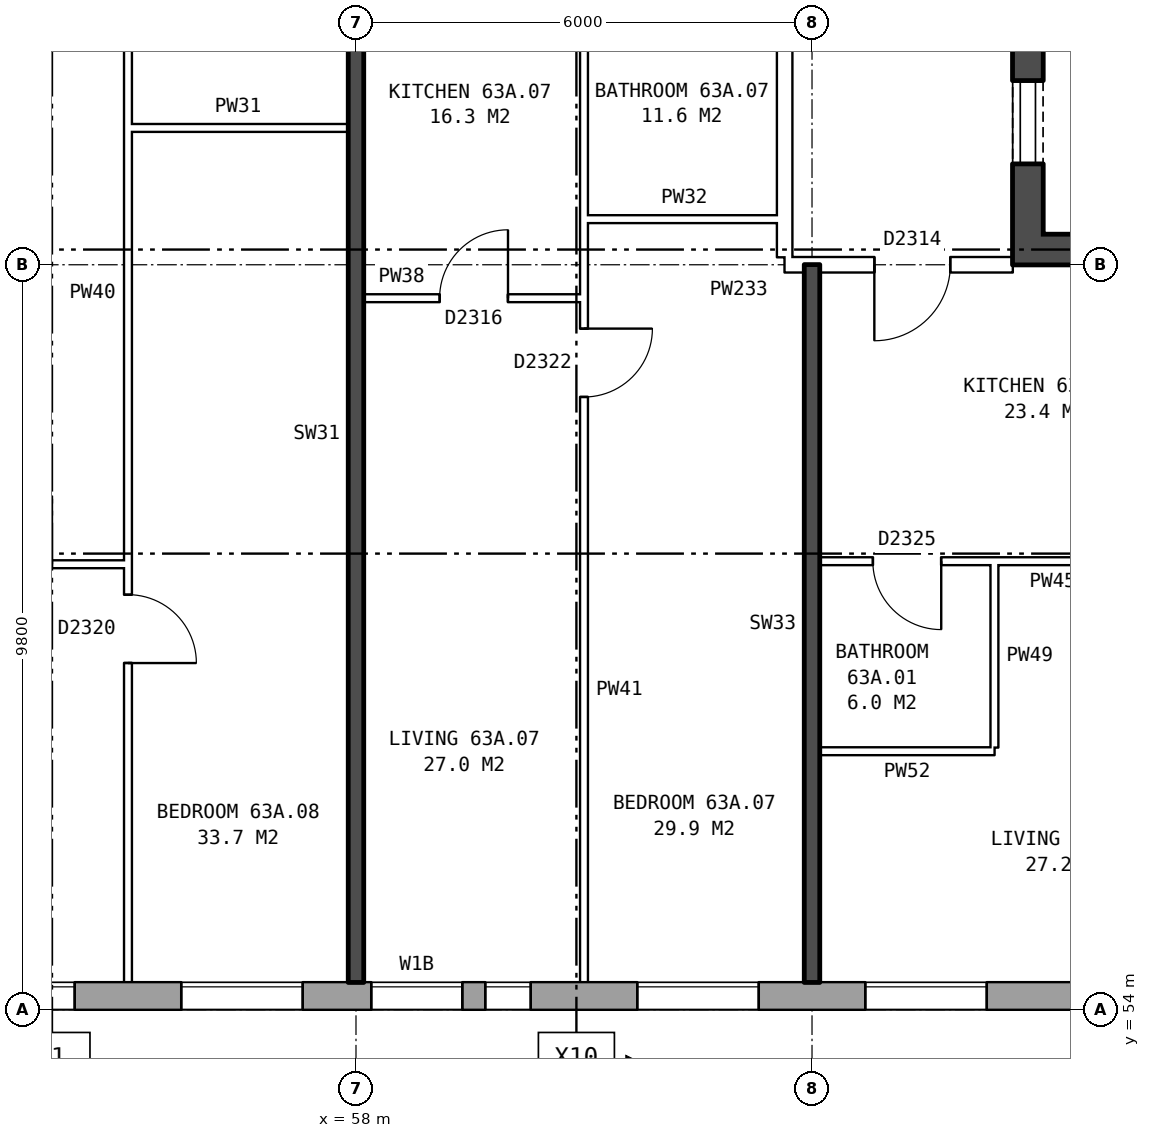
"""IFC4 building model, lengths in metres.
Left out: names, types, materials, properties, quantities, classifications, styles, units other than length and angle.
Written with IfcOpenShell. Run it as: python <this file> out.ifc"""

import sys

from ifc_helpers import new_model, si_unit, direction, frame, frame_2d, origin, place, context, subcontext, project, spatial, rectangle, extrude, element, fill, save


model = new_model("IFC4")
c1 = context("Model", 3, precision=1e-05, world=origin(), true_north=direction((0.0, 1.0)))
c2 = subcontext(c1, "Body", "Model", "MODEL_VIEW")
j1 = project(units=[si_unit("LENGTHUNIT", "METRE"), si_unit("PLANEANGLEUNIT", "RADIAN")], contexts=[c1])
p1 = place(None, origin())
s1 = spatial("IfcSite", under=j1, at=p1, CompositionType="ELEMENT")
p2 = place(p1, origin())
s2 = spatial("IfcBuilding", under=s1, at=p2, CompositionType="ELEMENT")
p3 = place(p2, frame((0.0, 0.0, 224.5)))
s3 = spatial("IfcBuildingStorey", under=s2, at=p3, CompositionType="ELEMENT", Elevation=224.5)
p4 = place(p3, frame((35.075, 54.18, 0.0), z_axis=(0.0, 0.0, 1.0), x_axis=(1.0, 0.0, 0.0)))
e1 = element("IfcWall", 1, at=p4, inside=s3, PredefinedType="STANDARD", context=c2, shape_type="SweptSolid", body=[
    extrude(rectangle(XDim=39.875, YDim=0.36, at=frame_2d((19.938, 0.0))), origin(), (0.0, 0.0, 1.0), 2.85),
])
p5 = place(p4, frame((2.625, 0.0, 0.8)))
e2 = element("IfcOpeningElement", 2, at=p5, cuts=e1, PredefinedType="OPENING", context=c2, shape_type="SweptSolid", body=[
    extrude(rectangle(XDim=1.6, YDim=1.8, at=frame_2d((0.8, 0.9))), frame((0.0, 0.19, 0.0), z_axis=(0.0, -1.0, 0.0), x_axis=(1.0, 0.0, 0.0)), (0.0, 0.0, 1.0), 0.38),
])
p6 = place(p4, frame((5.625, 0.0, 0.8)))
e3 = element("IfcOpeningElement", 3, at=p6, cuts=e1, PredefinedType="OPENING", context=c2, shape_type="SweptSolid", body=[
    extrude(rectangle(XDim=1.6, YDim=1.8, at=frame_2d((0.8, 0.9))), frame((0.0, 0.19, 0.0), z_axis=(0.0, -1.0, 0.0), x_axis=(1.0, 0.0, 0.0)), (0.0, 0.0, 1.0), 0.38),
])
p7 = place(p4, frame((8.625, 0.0, 0.8)))
e4 = element("IfcOpeningElement", 4, at=p7, cuts=e1, PredefinedType="OPENING", context=c2, shape_type="SweptSolid", body=[
    extrude(rectangle(XDim=1.6, YDim=1.8, at=frame_2d((0.8, 0.9))), frame((0.0, 0.19, 0.0), z_axis=(0.0, -1.0, 0.0), x_axis=(1.0, 0.0, 0.0)), (0.0, 0.0, 1.0), 0.38),
])
p8 = place(p4, frame((11.125, 0.0, 1.65)))
e5 = element("IfcOpeningElement", 5, at=p8, cuts=e1, PredefinedType="OPENING", context=c2, shape_type="SweptSolid", body=[
    extrude(rectangle(XDim=0.6, YDim=0.9, at=frame_2d((0.3, 0.45))), frame((0.0, 0.19, 0.0), z_axis=(0.0, -1.0, 0.0), x_axis=(1.0, 0.0, 0.0)), (0.0, 0.0, 1.0), 0.38),
])
p9 = place(p4, frame((14.625, 0.0, 0.8)))
e6 = element("IfcOpeningElement", 6, at=p9, cuts=e1, PredefinedType="OPENING", context=c2, shape_type="SweptSolid", body=[
    extrude(rectangle(XDim=1.6, YDim=1.8, at=frame_2d((0.8, 0.9))), frame((0.0, 0.19, 0.0), z_axis=(0.0, -1.0, 0.0), x_axis=(1.0, 0.0, 0.0)), (0.0, 0.0, 1.0), 0.38),
])
p10 = place(p4, frame((17.625, 0.0, 0.8)))
e7 = element("IfcOpeningElement", 7, at=p10, cuts=e1, PredefinedType="OPENING", context=c2, shape_type="SweptSolid", body=[
    extrude(rectangle(XDim=1.6, YDim=1.8, at=frame_2d((0.8, 0.9))), frame((0.0, 0.19, 0.0), z_axis=(0.0, -1.0, 0.0), x_axis=(1.0, 0.0, 0.0)), (0.0, 0.0, 1.0), 0.38),
])
p11 = place(p4, frame((20.625, 0.0, 0.8)))
e8 = element("IfcOpeningElement", 8, at=p11, cuts=e1, PredefinedType="OPENING", context=c2, shape_type="SweptSolid", body=[
    extrude(rectangle(XDim=1.6, YDim=1.8, at=frame_2d((0.8, 0.9))), frame((0.0, 0.19, 0.0), z_axis=(0.0, -1.0, 0.0), x_axis=(1.0, 0.0, 0.0)), (0.0, 0.0, 1.0), 0.38),
])
p12 = place(p4, frame((23.125, 0.0, 0.75)))
e9 = element("IfcOpeningElement", 9, at=p12, cuts=e1, PredefinedType="OPENING", context=c2, shape_type="SweptSolid", body=[
    extrude(rectangle(XDim=1.2, YDim=1.8, at=frame_2d((0.6, 0.9))), frame((0.0, 0.19, 0.0), z_axis=(0.0, -1.0, 0.0), x_axis=(1.0, 0.0, 0.0)), (0.0, 0.0, 1.0), 0.38),
])
p13 = place(p4, frame((26.625, 0.0, 0.8)))
e10 = element("IfcOpeningElement", 10, at=p13, cuts=e1, PredefinedType="OPENING", context=c2, shape_type="SweptSolid", body=[
    extrude(rectangle(XDim=1.6, YDim=1.8, at=frame_2d((0.8, 0.9))), frame((0.0, 0.19, 0.0), z_axis=(0.0, -1.0, 0.0), x_axis=(1.0, 0.0, 0.0)), (0.0, 0.0, 1.0), 0.38),
])
p14 = place(p4, frame((29.625, 0.0, 0.8)))
e11 = element("IfcOpeningElement", 11, at=p14, cuts=e1, PredefinedType="OPENING", context=c2, shape_type="SweptSolid", body=[
    extrude(rectangle(XDim=1.6, YDim=1.8, at=frame_2d((0.8, 0.9))), frame((0.0, 0.19, 0.0), z_axis=(0.0, -1.0, 0.0), x_axis=(1.0, 0.0, 0.0)), (0.0, 0.0, 1.0), 0.38),
])
p15 = place(p4, frame((32.625, 0.0, 0.8)))
e12 = element("IfcOpeningElement", 12, at=p15, cuts=e1, PredefinedType="OPENING", context=c2, shape_type="SweptSolid", body=[
    extrude(rectangle(XDim=1.6, YDim=1.8, at=frame_2d((0.8, 0.9))), frame((0.0, 0.19, 0.0), z_axis=(0.0, -1.0, 0.0), x_axis=(1.0, 0.0, 0.0)), (0.0, 0.0, 1.0), 0.38),
])
p16 = place(p4, frame((35.625, 0.0, 0.8)))
e13 = element("IfcOpeningElement", 13, at=p16, cuts=e1, PredefinedType="OPENING", context=c2, shape_type="SweptSolid", body=[
    extrude(rectangle(XDim=1.6, YDim=1.8, at=frame_2d((0.8, 0.9))), frame((0.0, 0.19, 0.0), z_axis=(0.0, -1.0, 0.0), x_axis=(1.0, 0.0, 0.0)), (0.0, 0.0, 1.0), 0.38),
])
p17 = place(p4, frame((12.925, 0.0, 0.15)))
e14 = element("IfcOpeningElement", 14, at=p17, cuts=e1, PredefinedType="OPENING", context=c2, shape_type="SweptSolid", body=[
    extrude(rectangle(XDim=0.8, YDim=1.5, at=frame_2d((0.4, 0.75))), frame((0.0, 0.19, 0.0), z_axis=(0.0, -1.0, 0.0), x_axis=(1.0, 0.0, 0.0)), (0.0, 0.0, 1.0), 0.38),
])
p18 = place(p4, frame((24.625, 0.0, 0.25)))
e15 = element("IfcOpeningElement", 15, at=p18, cuts=e1, PredefinedType="OPENING", context=c2, shape_type="SweptSolid", body=[
    extrude(rectangle(XDim=0.6, YDim=0.9, at=frame_2d((0.3, 0.45))), frame((0.0, 0.19, 0.0), z_axis=(0.0, -1.0, 0.0), x_axis=(1.0, 0.0, 0.0)), (0.0, 0.0, 1.0), 0.38),
])
p19 = place(p3, frame((66.84, 63.8, 0.0), z_axis=(0.0, 0.0, 1.0), x_axis=(0.0, 1.0, 0.0)))
e16 = element("IfcWall", 16, at=p19, inside=s3, PredefinedType="SHEAR", context=c2, shape_type="SweptSolid", body=[
    extrude(rectangle(XDim=12.4, YDim=0.4, at=frame_2d((6.2, 0.0))), origin(), (0.0, 0.0, 1.0), 2.85),
])
p20 = place(p19, frame((1.325, 0.0, 0.0)))
e17 = element("IfcOpeningElement", 17, at=p20, cuts=e16, PredefinedType="OPENING", context=c2, shape_type="SweptSolid", body=[
    extrude(rectangle(XDim=1.1, YDim=2.1, at=frame_2d((0.55, 1.05))), frame((0.0, 0.21, 0.0), z_axis=(0.0, -1.0, 0.0), x_axis=(1.0, 0.0, 0.0)), (0.0, 0.0, 1.0), 0.42),
])
p21 = place(p19, frame((3.6, 0.0, 0.0)))
e18 = element("IfcOpeningElement", 18, at=p21, cuts=e16, PredefinedType="OPENING", context=c2, shape_type="SweptSolid", body=[
    extrude(rectangle(XDim=1.1, YDim=2.1, at=frame_2d((0.55, 1.05))), frame((0.0, 0.21, 0.0), z_axis=(0.0, -1.0, 0.0), x_axis=(1.0, 0.0, 0.0)), (0.0, 0.0, 1.0), 0.42),
])
p22 = place(p19, frame((5.8, 0.0, 0.0)))
e19 = element("IfcOpeningElement", 19, at=p22, cuts=e16, PredefinedType="OPENING", context=c2, shape_type="SweptSolid", body=[
    extrude(rectangle(XDim=1.1, YDim=2.1, at=frame_2d((0.55, 1.05))), frame((0.0, 0.21, 0.0), z_axis=(0.0, -1.0, 0.0), x_axis=(1.0, 0.0, 0.0)), (0.0, 0.0, 1.0), 0.42),
])
p23 = place(p19, frame((8.0, 0.0, 0.0)))
e20 = element("IfcOpeningElement", 20, at=p23, cuts=e16, PredefinedType="OPENING", context=c2, shape_type="SweptSolid", body=[
    extrude(rectangle(XDim=1.1, YDim=2.1, at=frame_2d((0.55, 1.05))), frame((0.0, 0.21, 0.0), z_axis=(0.0, -1.0, 0.0), x_axis=(1.0, 0.0, 0.0)), (0.0, 0.0, 1.0), 0.42),
])
p24 = place(p19, frame((9.9, 0.0, 0.0)))
e21 = element("IfcOpeningElement", 21, at=p24, cuts=e16, PredefinedType="OPENING", context=c2, shape_type="SweptSolid", body=[
    extrude(rectangle(XDim=1.1, YDim=2.1, at=frame_2d((0.55, 1.05))), frame((0.0, 0.21, 0.0), z_axis=(0.0, -1.0, 0.0), x_axis=(1.0, 0.0, 0.0)), (0.0, 0.0, 1.0), 0.42),
])
p25 = place(p3, frame((67.04, 64.0, 0.0), z_axis=(0.0, 0.0, 1.0), x_axis=(1.0, 0.0, 0.0)))
e22 = element("IfcWall", 22, at=p25, inside=s3, PredefinedType="SHEAR", context=c2, shape_type="SweptSolid", body=[
    extrude(rectangle(XDim=8.2, YDim=0.4, at=frame_2d((4.1, 0.0))), origin(), (0.0, 0.0, 1.0), 2.85),
])
p26 = place(p3, frame((63.64, 63.9, 0.0), z_axis=(0.0, 0.0, 1.0), x_axis=(0.0, 1.0, 0.0)))
e23 = element("IfcWall", 23, at=p26, inside=s3, PredefinedType="PARTITIONING", context=c2, shape_type="SweptSolid", body=[
    extrude(rectangle(XDim=12.2, YDim=0.2, at=frame_2d((6.1, 0.0))), origin(), (0.0, 0.0, 1.0), 2.85),
])
p27 = place(p26, frame((5.1, 0.0, 0.0)))
e24 = element("IfcOpeningElement", 24, at=p27, cuts=e23, PredefinedType="OPENING", context=c2, shape_type="SweptSolid", body=[
    extrude(rectangle(XDim=2.0, YDim=2.1, at=frame_2d((1.0, 1.05))), frame((0.0, 0.11, 0.0), z_axis=(0.0, -1.0, 0.0), x_axis=(1.0, 0.0, 0.0)), (0.0, 0.0, 1.0), 0.22),
])
p28 = place(p3, frame((64.1, 57.4, 0.0), z_axis=(0.0, 0.0, 1.0), x_axis=(1.0, 0.0, 0.0)))
e25 = element("IfcWall", 25, at=p28, inside=s3, PredefinedType="PARTITIONING", context=c2, shape_type="SweptSolid", body=[
    extrude(rectangle(XDim=2.3, YDim=0.1, at=frame_2d((1.15, 0.0))), origin(), (0.0, 0.0, 1.0), 2.85),
])
p29 = place(p3, frame((52.1, 59.86, 0.0), z_axis=(0.0, 0.0, 1.0), x_axis=(1.0, 0.0, 0.0)))
e26 = element("IfcWall", 26, at=p29, inside=s3, PredefinedType="PARTITIONING", context=c2, shape_type="SweptSolid", body=[
    extrude(rectangle(XDim=2.9, YDim=0.1, at=frame_2d((1.45, 0.0))), origin(), (0.0, 0.0, 1.0), 2.85),
])
p30 = place(p29, frame((1.0, 0.0, 0.0)))
e27 = element("IfcOpeningElement", 27, at=p30, cuts=e26, PredefinedType="OPENING", context=c2, shape_type="SweptSolid", body=[
    extrude(rectangle(XDim=0.9, YDim=2.1, at=frame_2d((0.45, 1.05))), frame((0.0, 0.06, 0.0), z_axis=(0.0, -1.0, 0.0), x_axis=(1.0, 0.0, 0.0)), (0.0, 0.0, 1.0), 0.12),
])
p31 = place(p3, frame((64.1, 59.9, 0.0), z_axis=(0.0, 0.0, 1.0), x_axis=(1.0, 0.0, 0.0)))
e28 = element("IfcWall", 28, at=p31, inside=s3, PredefinedType="PARTITIONING", context=c2, shape_type="SweptSolid", body=[
    extrude(rectangle(XDim=5.8, YDim=0.1, at=frame_2d((2.9, 0.0))), origin(), (0.0, 0.0, 1.0), 2.85),
])
p32 = place(p31, frame((3.6, 0.0, 0.0)))
e29 = element("IfcOpeningElement", 29, at=p32, cuts=e28, PredefinedType="OPENING", context=c2, shape_type="SweptSolid", body=[
    extrude(rectangle(XDim=0.9, YDim=2.1, at=frame_2d((0.45, 1.05))), frame((0.0, 0.06, 0.0), z_axis=(0.0, -1.0, 0.0), x_axis=(1.0, 0.0, 0.0)), (0.0, 0.0, 1.0), 0.12),
])
p33 = place(p31, frame((0.7, 0.0, 0.0)))
e30 = element("IfcOpeningElement", 30, at=p33, cuts=e28, PredefinedType="OPENING", context=c2, shape_type="SweptSolid", body=[
    extrude(rectangle(XDim=0.9, YDim=2.1, at=frame_2d((0.45, 1.05))), frame((0.0, 0.06, 0.0), z_axis=(0.0, -1.0, 0.0), x_axis=(1.0, 0.0, 0.0)), (0.0, 0.0, 1.0), 0.12),
])
p34 = place(p3, frame((58.1, 63.36, 0.0), z_axis=(0.0, 0.0, 1.0), x_axis=(1.0, 0.0, 0.0)))
e31 = element("IfcWall", 31, at=p34, inside=s3, PredefinedType="PARTITIONING", context=c2, shape_type="SweptSolid", body=[
    extrude(rectangle(XDim=2.9, YDim=0.1, at=frame_2d((1.45, 0.0))), origin(), (0.0, 0.0, 1.0), 2.85),
])
p35 = place(p34, frame((1.0, 0.0, 0.0)))
e32 = element("IfcOpeningElement", 32, at=p35, cuts=e31, PredefinedType="OPENING", context=c2, shape_type="SweptSolid", body=[
    extrude(rectangle(XDim=0.9, YDim=2.1, at=frame_2d((0.45, 1.05))), frame((0.0, 0.06, 0.0), z_axis=(0.0, -1.0, 0.0), x_axis=(1.0, 0.0, 0.0)), (0.0, 0.0, 1.0), 0.12),
])
p36 = place(p3, frame((63.64, 63.8, 0.0), z_axis=(0.0, 0.0, 1.0), x_axis=(1.0, 0.0, 0.0)))
e33 = element("IfcWall", 33, at=p36, inside=s3, PredefinedType="PARTITIONING", context=c2, shape_type="SweptSolid", body=[
    extrude(rectangle(XDim=3.0, YDim=0.2, at=frame_2d((1.5, 0.0))), origin(), (0.0, 0.0, 1.0), 2.85),
])
p37 = place(p36, frame((1.18, 0.0, 0.0)))
e34 = element("IfcOpeningElement", 34, at=p37, cuts=e33, PredefinedType="OPENING", context=c2, shape_type="SweptSolid", body=[
    extrude(rectangle(XDim=1.0, YDim=2.1, at=frame_2d((0.5, 1.05))), frame((0.0, 0.11, 0.0), z_axis=(0.0, -1.0, 0.0), x_axis=(1.0, 0.0, 0.0)), (0.0, 0.0, 1.0), 0.22),
])
p38 = place(p3, frame((61.0, 64.4, 0.0), z_axis=(0.0, 0.0, 1.0), x_axis=(1.0, 0.0, 0.0)))
e35 = element("IfcWall", 35, at=p38, inside=s3, PredefinedType="PARTITIONING", context=c2, shape_type="SweptSolid", body=[
    extrude(rectangle(XDim=2.64, YDim=0.1, at=frame_2d((1.32, 0.0))), origin(), (0.0, 0.0, 1.0), 2.85),
])
p39 = place(p3, frame((55.0, 65.6, 0.0), z_axis=(0.0, 0.0, 1.0), x_axis=(1.0, 0.0, 0.0)))
e36 = element("IfcWall", 36, at=p39, inside=s3, PredefinedType="PARTITIONING", context=c2, shape_type="SweptSolid", body=[
    extrude(rectangle(XDim=2.9, YDim=0.1, at=frame_2d((1.45, 0.0))), origin(), (0.0, 0.0, 1.0), 2.85),
])
p40 = place(p3, frame((55.0, 54.36, 0.0), z_axis=(0.0, 0.0, 1.0), x_axis=(0.0, 1.0, 0.0)))
e37 = element("IfcWall", 37, at=p40, inside=s3, PredefinedType="PARTITIONING", context=c2, shape_type="SweptSolid", body=[
    extrude(rectangle(XDim=14.34, YDim=0.1, at=frame_2d((7.17, 0.0))), origin(), (0.0, 0.0, 1.0), 2.85),
])
p41 = place(p40, frame((4.2, 0.0, 0.0)))
e38 = element("IfcOpeningElement", 38, at=p41, cuts=e37, PredefinedType="OPENING", context=c2, shape_type="SweptSolid", body=[
    extrude(rectangle(XDim=0.9, YDim=2.1, at=frame_2d((0.45, 1.05))), frame((0.0, 0.06, 0.0), z_axis=(0.0, -1.0, 0.0), x_axis=(1.0, 0.0, 0.0)), (0.0, 0.0, 1.0), 0.12),
])
p42 = place(p40, frame((13.04, 0.0, 0.0)))
e39 = element("IfcOpeningElement", 39, at=p42, cuts=e37, PredefinedType="OPENING", context=c2, shape_type="SweptSolid", body=[
    extrude(rectangle(XDim=0.9, YDim=2.1, at=frame_2d((0.45, 1.05))), frame((0.0, 0.06, 0.0), z_axis=(0.0, -1.0, 0.0), x_axis=(1.0, 0.0, 0.0)), (0.0, 0.0, 1.0), 0.12),
])
p43 = place(p3, frame((58.0, 54.36, 0.0), z_axis=(0.0, 0.0, 1.0), x_axis=(0.0, 1.0, 0.0)))
e40 = element("IfcWall", 40, at=p43, inside=s3, PredefinedType="SOLIDWALL", context=c2, shape_type="SweptSolid", body=[
    extrude(rectangle(XDim=14.44, YDim=0.2, at=frame_2d((7.22, 0.0))), origin(), (0.0, 0.0, 1.0), 2.85),
])
p44 = place(p3, frame((61.0, 54.36, 0.0), z_axis=(0.0, 0.0, 1.0), x_axis=(0.0, 1.0, 0.0)))
e41 = element("IfcWall", 41, at=p44, inside=s3, PredefinedType="PARTITIONING", context=c2, shape_type="SweptSolid", body=[
    extrude(rectangle(XDim=14.34, YDim=0.1, at=frame_2d((7.17, 0.0))), origin(), (0.0, 0.0, 1.0), 2.85),
])
p45 = place(p44, frame((7.7, 0.0, 0.0)))
e42 = element("IfcOpeningElement", 42, at=p45, cuts=e41, PredefinedType="OPENING", context=c2, shape_type="SweptSolid", body=[
    extrude(rectangle(XDim=0.9, YDim=2.1, at=frame_2d((0.45, 1.05))), frame((0.0, 0.06, 0.0), z_axis=(0.0, -1.0, 0.0), x_axis=(1.0, 0.0, 0.0)), (0.0, 0.0, 1.0), 0.12),
])
p46 = place(p44, frame((13.04, 0.0, 0.0)))
e43 = element("IfcOpeningElement", 43, at=p46, cuts=e41, PredefinedType="OPENING", context=c2, shape_type="SweptSolid", body=[
    extrude(rectangle(XDim=0.9, YDim=2.1, at=frame_2d((0.45, 1.05))), frame((0.0, 0.06, 0.0), z_axis=(0.0, -1.0, 0.0), x_axis=(1.0, 0.0, 0.0)), (0.0, 0.0, 1.0), 0.12),
])
p47 = place(p3, frame((64.0, 54.36, 0.0), z_axis=(0.0, 0.0, 1.0), x_axis=(0.0, 1.0, 0.0)))
e44 = element("IfcWall", 44, at=p47, inside=s3, PredefinedType="SOLIDWALL", context=c2, shape_type="SweptSolid", body=[
    extrude(rectangle(XDim=9.44, YDim=0.2, at=frame_2d((4.72, 0.0))), origin(), (0.0, 0.0, 1.0), 2.85),
])
p48 = place(p3, frame((66.4, 57.45, 0.0), z_axis=(0.0, 0.0, 1.0), x_axis=(0.0, 1.0, 0.0)))
e45 = element("IfcWall", 45, at=p48, inside=s3, PredefinedType="PARTITIONING", context=c2, shape_type="SweptSolid", body=[
    extrude(rectangle(XDim=2.4, YDim=0.1, at=frame_2d((1.2, 0.0))), origin(), (0.0, 0.0, 1.0), 2.85),
])
p49 = place(p10, origin())
e46 = element("IfcWindow", 46, at=p49, inside=s3, PartitioningType="SINGLE_PANEL", PredefinedType="WINDOW", context=c2, shape_type="SweptSolid", body=[
    extrude(rectangle(XDim=1.6, YDim=1.8, at=frame_2d((0.8, 0.9))), frame((0.0, 0.15, 0.0), z_axis=(0.0, -1.0, 0.0), x_axis=(1.0, 0.0, 0.0)), (0.0, 0.0, 1.0), 0.06),
])
fill(e7, e46)
p50 = place(p11, origin())
e47 = element("IfcWindow", 47, at=p50, inside=s3, PartitioningType="SINGLE_PANEL", PredefinedType="WINDOW", context=c2, shape_type="SweptSolid", body=[
    extrude(rectangle(XDim=1.6, YDim=1.8, at=frame_2d((0.8, 0.9))), frame((0.0, 0.15, 0.0), z_axis=(0.0, -1.0, 0.0), x_axis=(1.0, 0.0, 0.0)), (0.0, 0.0, 1.0), 0.06),
])
fill(e8, e47)
p51 = place(p12, origin())
e48 = element("IfcWindow", 48, at=p51, inside=s3, PartitioningType="SINGLE_PANEL", PredefinedType="WINDOW", context=c2, shape_type="SweptSolid", body=[
    extrude(rectangle(XDim=1.2, YDim=1.8, at=frame_2d((0.6, 0.9))), frame((0.0, 0.15, 0.0), z_axis=(0.0, -1.0, 0.0), x_axis=(1.0, 0.0, 0.0)), (0.0, 0.0, 1.0), 0.06),
])
fill(e9, e48)
p52 = place(p13, origin())
e49 = element("IfcWindow", 49, at=p52, inside=s3, PartitioningType="SINGLE_PANEL", PredefinedType="WINDOW", context=c2, shape_type="SweptSolid", body=[
    extrude(rectangle(XDim=1.6, YDim=1.8, at=frame_2d((0.8, 0.9))), frame((0.0, 0.15, 0.0), z_axis=(0.0, -1.0, 0.0), x_axis=(1.0, 0.0, 0.0)), (0.0, 0.0, 1.0), 0.06),
])
fill(e10, e49)
p53 = place(p14, origin())
e50 = element("IfcWindow", 50, at=p53, inside=s3, PartitioningType="SINGLE_PANEL", PredefinedType="WINDOW", context=c2, shape_type="SweptSolid", body=[
    extrude(rectangle(XDim=1.6, YDim=1.8, at=frame_2d((0.8, 0.9))), frame((0.0, 0.15, 0.0), z_axis=(0.0, -1.0, 0.0), x_axis=(1.0, 0.0, 0.0)), (0.0, 0.0, 1.0), 0.06),
])
fill(e11, e50)
p54 = place(p20, origin())
e51 = element("IfcDoor", 51, at=p54, inside=s3, OperationType="DOUBLE_DOOR_SLIDING", PredefinedType="DOOR", context=c2, shape_type="SweptSolid", body=[
    extrude(rectangle(XDim=1.1, YDim=2.1, at=frame_2d((0.55, 1.05))), frame((0.0, -0.135, 0.0), z_axis=(0.0, -1.0, 0.0), x_axis=(1.0, 0.0, 0.0)), (0.0, 0.0, 1.0), 0.05),
])
fill(e17, e51)
p55 = place(p37, frame((1.0, 0.0, 0.0), z_axis=(0.0, 0.0, 1.0), x_axis=(-1.0, 0.0, 0.0)))
e52 = element("IfcDoor", 52, at=p55, inside=s3, OperationType="SINGLE_SWING_RIGHT", PredefinedType="DOOR", context=c2, shape_type="SweptSolid", body=[
    extrude(rectangle(XDim=1.0, YDim=2.1, at=frame_2d((0.5, 1.05))), frame((0.0, 0.025, 0.0), z_axis=(0.0, -1.0, 0.0), x_axis=(1.0, 0.0, 0.0)), (0.0, 0.0, 1.0), 0.05),
])
fill(e34, e52)
p56 = place(p33, frame((0.9, 0.0, 0.0), z_axis=(0.0, 0.0, 1.0), x_axis=(-1.0, 0.0, 0.0)))
e53 = element("IfcDoor", 53, at=p56, inside=s3, OperationType="SINGLE_SWING_LEFT", PredefinedType="DOOR", context=c2, shape_type="SweptSolid", body=[
    extrude(rectangle(XDim=0.9, YDim=2.1, at=frame_2d((0.45, 1.05))), frame((0.0, 0.025, 0.0), z_axis=(0.0, -1.0, 0.0), x_axis=(1.0, 0.0, 0.0)), (0.0, 0.0, 1.0), 0.05),
])
fill(e30, e53)
p57 = place(p45, frame((0.9, 0.0, 0.0), z_axis=(0.0, 0.0, 1.0), x_axis=(-1.0, 0.0, 0.0)))
e54 = element("IfcDoor", 54, at=p57, inside=s3, OperationType="SINGLE_SWING_LEFT", PredefinedType="DOOR", context=c2, shape_type="SweptSolid", body=[
    extrude(rectangle(XDim=0.9, YDim=2.1, at=frame_2d((0.45, 1.05))), frame((0.0, 0.025, 0.0), z_axis=(0.0, -1.0, 0.0), x_axis=(1.0, 0.0, 0.0)), (0.0, 0.0, 1.0), 0.05),
])
fill(e42, e54)
p58 = place(p35, origin())
e55 = element("IfcDoor", 55, at=p58, inside=s3, OperationType="SINGLE_SWING_RIGHT", PredefinedType="DOOR", context=c2, shape_type="SweptSolid", body=[
    extrude(rectangle(XDim=0.9, YDim=2.1, at=frame_2d((0.45, 1.05))), frame((0.0, 0.025, 0.0), z_axis=(0.0, -1.0, 0.0), x_axis=(1.0, 0.0, 0.0)), (0.0, 0.0, 1.0), 0.05),
])
fill(e32, e55)
p59 = place(p41, frame((0.9, 0.0, 0.0), z_axis=(0.0, 0.0, 1.0), x_axis=(-1.0, 0.0, 0.0)))
e56 = element("IfcDoor", 56, at=p59, inside=s3, OperationType="SINGLE_SWING_RIGHT", PredefinedType="DOOR", context=c2, shape_type="SweptSolid", body=[
    extrude(rectangle(XDim=0.9, YDim=2.1, at=frame_2d((0.45, 1.05))), frame((0.0, 0.025, 0.0), z_axis=(0.0, -1.0, 0.0), x_axis=(1.0, 0.0, 0.0)), (0.0, 0.0, 1.0), 0.05),
])
fill(e38, e56)
p60 = place(p18, origin())
e57 = element("IfcWindow", 57, at=p60, inside=s3, PartitioningType="SINGLE_PANEL", PredefinedType="WINDOW", context=c2, shape_type="SweptSolid", body=[
    extrude(rectangle(XDim=0.6, YDim=0.9, at=frame_2d((0.3, 0.45))), frame((0.0, 0.15, 0.0), z_axis=(0.0, -1.0, 0.0), x_axis=(1.0, 0.0, 0.0)), (0.0, 0.0, 1.0), 0.06),
])
fill(e15, e57)
save(model, sys.argv[1])
